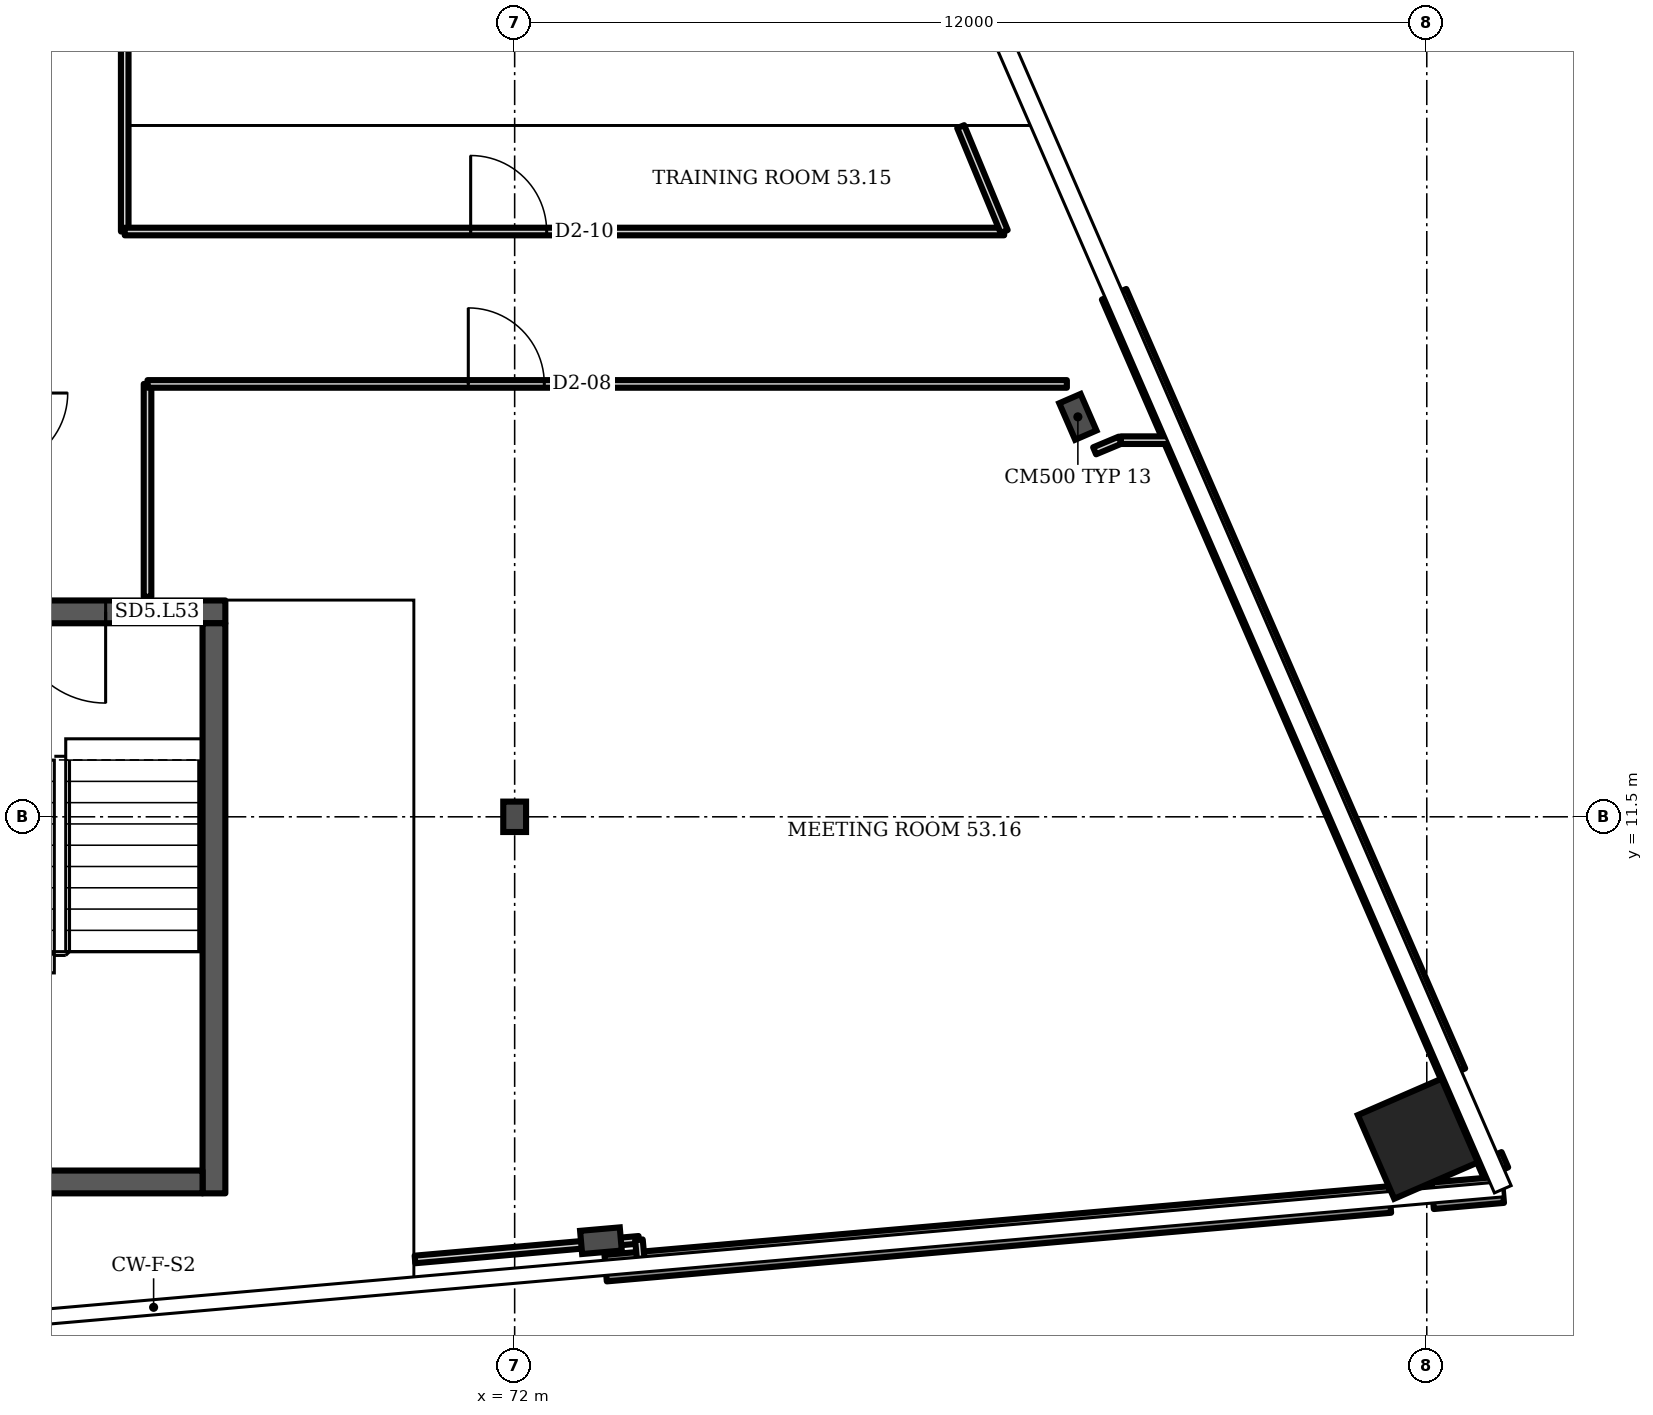
"""IFC4 building model, lengths in metres.
Left out: names, types, materials, properties, quantities, classifications, styles, units other than length and angle.
Written with IfcOpenShell. Run it as: python <this file> out.ifc"""

import sys

from ifc_helpers import new_model, si_unit, direction, frame, frame_2d, origin, origin_2d, place, context, subcontext, project, spatial, rectangle, i_section, extrude, element, fill, save


model = new_model("IFC4")
c1 = context("Model", 3, precision=1e-05, world=origin(), true_north=direction((0.0, 1.0)))
c2 = subcontext(c1, "Body", "Model", "MODEL_VIEW")
j1 = project(units=[si_unit("LENGTHUNIT", "METRE"), si_unit("PLANEANGLEUNIT", "RADIAN")], contexts=[c1])
p1 = place(None, origin())
s1 = spatial("IfcSite", under=j1, at=p1, CompositionType="ELEMENT")
p2 = place(p1, origin())
s2 = spatial("IfcBuilding", under=s1, at=p2, CompositionType="ELEMENT")
p3 = place(p2, frame((0.0, 0.0, 214.3)))
s3 = spatial("IfcBuildingStorey", under=s2, at=p3, CompositionType="ELEMENT", Elevation=214.3)
p4 = place(p3, frame((83.883, 7.265, 0.0), z_axis=(0.0, 0.0, 1.0), x_axis=(-0.398727, 0.917072, 0.0)))
e1 = element("IfcColumn", 1, at=p4, inside=s3, PredefinedType="COLUMN", context=c2, shape_type="SweptSolid", body=[
    extrude(rectangle(XDim=1.2, YDim=1.2, at=origin_2d()), origin(), (0.0, 0.0, 1.0), 3.6),
])
for number, where, z_axis, x_axis in (
    (2, (73.135, 5.923, 0.0), (0.0, 0.0, 1.0), (0.087, -0.996, 0.0)),
    (3, (79.41, 16.762, 0.0), (0.0, 0.0, 1.0), (0.917, 0.399, 0.0)),
):
    element("IfcColumn", number, at=place(p3, frame(where, z_axis=z_axis, x_axis=x_axis)), inside=s3, PredefinedType="COLUMN", context=c2, shape_type="SweptSolid", body=[
        extrude(i_section(OverallWidth=0.306, OverallDepth=0.524, WebThickness=0.021, FlangeThickness=0.04, FilletRadius=0.027, at=origin_2d()), origin(), (0.0, 0.0, 1.0), 3.6),
    ])
p5 = place(p3, frame((72.0, 11.5, 0.0), z_axis=(0.0, 0.0, 1.0), x_axis=(1.0, 0.0, 0.0)))
e4 = element("IfcColumn", 4, at=p5, inside=s3, PredefinedType="COLUMN", context=c2, shape_type="SweptSolid", body=[
    extrude(i_section(OverallWidth=0.3, OverallDepth=0.4, WebThickness=0.013, FlangeThickness=0.024, FilletRadius=0.027, at=origin_2d()), origin(), (0.0, 0.0, 1.0), 3.6),
])
p6 = place(p3, frame((73.197, 5.562, 0.0), z_axis=(0.0, 0.0, 1.0), x_axis=(0.996198, 0.087163, 0.0)))
e5 = element("IfcWall", 5, at=p6, inside=s3, PredefinedType="SOLIDWALL", context=c2, shape_type="SweptSolid", body=[
    extrude(rectangle(XDim=10.358, YDim=0.35, at=frame_2d((5.179, 0.0))), origin(), (0.0, 0.0, 1.0), 1.0),
])
p7 = place(p3, frame((84.078, 6.514, 0.0), z_axis=(0.0, 0.0, 1.0), x_axis=(0.996213, 0.086971, 0.0)))
e6 = element("IfcWall", 6, at=p7, inside=s3, PredefinedType="SOLIDWALL", context=c2, shape_type="SweptSolid", body=[
    extrude(rectangle(XDim=0.926, YDim=0.35, at=frame_2d((0.463, 0.0))), origin(), (0.0, 0.0, 1.0), 1.0),
])
p8 = place(p3, frame((84.91, 6.819, 0.0), z_axis=(0.0, 0.0, 1.0), x_axis=(-0.398359, 0.91723, 0.0)))
e7 = element("IfcWall", 7, at=p8, inside=s3, PredefinedType="SOLIDWALL", context=c2, shape_type="SweptSolid", body=[
    extrude(rectangle(XDim=0.219, YDim=0.35, at=frame_2d((0.109, 0.0))), origin(), (0.0, 0.0, 1.0), 1.0),
])
p9 = place(p3, frame((84.345, 8.12, 0.0), z_axis=(0.0, 0.0, 1.0), x_axis=(-0.398721, 0.917067, 0.0)))
e8 = element("IfcWall", 8, at=p9, inside=s3, PredefinedType="SOLIDWALL", context=c2, shape_type="SweptSolid", body=[
    extrude(rectangle(XDim=11.182, YDim=0.35, at=frame_2d((5.591, 0.0))), origin(), (0.0, 0.0, 1.0), 1.0),
])
p10 = place(p3, frame((63.844, 14.196, 0.0), z_axis=(0.0, 0.0, 1.0), x_axis=(1.0, 0.0, 0.0)))
e9 = element("IfcWall", 9, at=p10, inside=s3, PredefinedType="SHEAR", context=c2, shape_type="SweptSolid", body=[
    extrude(rectangle(XDim=4.35, YDim=0.3, at=frame_2d((2.175, 0.0))), origin(), (0.0, 0.0, 1.0), 3.2),
])
p11 = place(p10, frame((1.575, 0.0, 0.0)))
e10 = element("IfcOpeningElement", 10, at=p11, cuts=e9, PredefinedType="OPENING", context=c2, shape_type="SweptSolid", body=[
    extrude(rectangle(XDim=1.2, YDim=2.1, at=frame_2d((0.6, 1.05))), frame((0.0, 0.16, 0.0), z_axis=(0.0, -1.0, 0.0), x_axis=(1.0, 0.0, 0.0)), (0.0, 0.0, 1.0), 0.32),
])
p12 = place(p3, frame((66.87, 19.2, 0.0), z_axis=(0.0, 0.0, 1.0), x_axis=(0.0, 1.0, 0.0)))
e11 = element("IfcWall", 11, at=p12, inside=s3, PredefinedType="PARTITIONING", context=c2, shape_type="SweptSolid", body=[
    extrude(rectangle(XDim=2.575, YDim=0.1, at=frame_2d((1.288, 0.0))), origin(), (0.0, 0.0, 1.0), 3.2),
])
p13 = place(p3, frame((66.87, 19.2, 0.0), z_axis=(0.0, 0.0, 1.0), x_axis=(1.0, 0.0, 0.0)))
e12 = element("IfcWall", 12, at=p13, inside=s3, PredefinedType="PARTITIONING", context=c2, shape_type="SweptSolid", body=[
    extrude(rectangle(XDim=11.57, YDim=0.1, at=frame_2d((5.785, 0.0))), origin(), (0.0, 0.0, 1.0), 3.2),
])
p14 = place(p13, frame((4.551, 0.0, 0.0)))
e13 = element("IfcOpeningElement", 13, at=p14, cuts=e12, PredefinedType="OPENING", context=c2, shape_type="SweptSolid", body=[
    extrude(rectangle(XDim=1.0, YDim=2.1, at=frame_2d((0.5, 1.05))), frame((0.0, 0.06, 0.0), z_axis=(0.0, -1.0, 0.0), x_axis=(1.0, 0.0, 0.0)), (0.0, 0.0, 1.0), 0.12),
])
p15 = place(p3, frame((67.17, 14.395, 0.0), z_axis=(0.0, 0.0, 1.0), x_axis=(0.0, 1.0, 0.0)))
e14 = element("IfcWall", 14, at=p15, inside=s3, PredefinedType="PARTITIONING", context=c2, shape_type="SweptSolid", body=[
    extrude(rectangle(XDim=2.8, YDim=0.1, at=frame_2d((1.4, 0.0))), origin(), (0.0, 0.0, 1.0), 3.2),
])
p16 = place(p3, frame((67.17, 17.195, 0.0), z_axis=(0.0, 0.0, 1.0), x_axis=(1.0, 0.0, 0.0)))
e15 = element("IfcWall", 15, at=p16, inside=s3, PredefinedType="PARTITIONING", context=c2, shape_type="SweptSolid", body=[
    extrude(rectangle(XDim=12.095, YDim=0.1, at=frame_2d((6.047, 0.0))), origin(), (0.0, 0.0, 1.0), 3.2),
])
p17 = place(p16, frame((4.22, 0.0, 0.0)))
e16 = element("IfcOpeningElement", 16, at=p17, cuts=e15, PredefinedType="OPENING", context=c2, shape_type="SweptSolid", body=[
    extrude(rectangle(XDim=1.0, YDim=2.1, at=frame_2d((0.5, 1.05))), frame((0.0, 0.06, 0.0), z_axis=(0.0, -1.0, 0.0), x_axis=(1.0, 0.0, 0.0)), (0.0, 0.0, 1.0), 0.12),
])
p18 = place(p3, frame((70.689, 5.677, 0.0), z_axis=(0.0, 0.0, 1.0), x_axis=(0.996174, 0.087417, 0.0)))
e17 = element("IfcWall", 17, at=p18, inside=s3, PredefinedType="PARTITIONING", context=c2, shape_type="SweptSolid", body=[
    extrude(rectangle(XDim=2.958, YDim=0.1, at=frame_2d((1.479, 0.0))), origin(), (0.0, 0.0, 1.0), 2.58),
])
p19 = place(p3, frame((73.663, 5.628, 0.0), z_axis=(0.0, 0.0, 1.0), x_axis=(-0.091893, 0.995772, 0.0)))
e18 = element("IfcWall", 18, at=p19, inside=s3, PredefinedType="PARTITIONING", context=c2, shape_type="SweptSolid", body=[
    extrude(rectangle(XDim=0.308, YDim=0.1, at=frame_2d((0.154, 0.0))), origin(), (0.0, 0.0, 1.0), 3.2),
])
p20 = place(p3, frame((78.44, 19.2, 0.0), z_axis=(0.0, 0.0, 1.0), x_axis=(-0.382605, 0.923907, 0.0)))
e19 = element("IfcWall", 19, at=p20, inside=s3, PredefinedType="PARTITIONING", context=c2, shape_type="SweptSolid", body=[
    extrude(rectangle(XDim=1.494, YDim=0.1, at=frame_2d((0.747, 0.0))), origin(), (0.0, 0.0, 1.0), 3.2),
])
p21 = place(p3, frame((79.63, 16.315, 0.0), z_axis=(0.0, 0.0, 1.0), x_axis=(0.92262, 0.385713, 0.0)))
e20 = element("IfcWall", 20, at=p21, inside=s3, PredefinedType="PARTITIONING", context=c2, shape_type="SweptSolid", body=[
    extrude(rectangle(XDim=0.363, YDim=0.1, at=frame_2d((0.182, 0.0))), origin(), (0.0, 0.0, 1.0), 3.2),
])
p22 = place(p3, frame((79.975, 16.455, 0.0), z_axis=(0.0, 0.0, 1.0), x_axis=(1.0, 0.0, 0.0)))
e21 = element("IfcWall", 21, at=p22, inside=s3, PredefinedType="PARTITIONING", context=c2, shape_type="SweptSolid", body=[
    extrude(rectangle(XDim=0.718, YDim=0.1, at=frame_2d((0.359, 0.0))), origin(), (0.0, 0.0, 1.0), 3.2),
])
p23 = place(p3, frame((68.044, 6.546, 0.0), z_axis=(0.0, 0.0, 1.0), x_axis=(0.0, 1.0, 0.0)))
e22 = element("IfcWall", 22, at=p23, inside=s3, PredefinedType="SHEAR", context=c2, shape_type="SweptSolid", body=[
    extrude(rectangle(XDim=7.5, YDim=0.3, at=frame_2d((3.75, 0.0))), origin(), (0.0, 0.0, 1.0), 3.2),
])
p24 = place(p3, frame((64.144, 6.696, 0.0), z_axis=(0.0, 0.0, 1.0), x_axis=(1.0, 0.0, 0.0)))
e23 = element("IfcWall", 23, at=p24, inside=s3, PredefinedType="SHEAR", context=c2, shape_type="SweptSolid", body=[
    extrude(rectangle(XDim=3.75, YDim=0.3, at=frame_2d((1.875, 0.0))), origin(), (0.0, 0.0, 1.0), 3.2),
])
p25 = place(p11, origin())
e24 = element("IfcDoor", 24, at=p25, inside=s3, OperationType="SINGLE_SWING_RIGHT", PredefinedType="DOOR", context=c2, shape_type="SweptSolid", body=[
    extrude(rectangle(XDim=1.2, YDim=2.1, at=frame_2d((0.6, 1.05))), frame((0.0, 0.025, 0.0), z_axis=(0.0, -1.0, 0.0), x_axis=(1.0, 0.0, 0.0)), (0.0, 0.0, 1.0), 0.05),
])
fill(e10, e24)
p26 = place(p17, origin())
e25 = element("IfcDoor", 25, at=p26, inside=s3, OperationType="SINGLE_SWING_LEFT", PredefinedType="DOOR", context=c2, shape_type="SweptSolid", body=[
    extrude(rectangle(XDim=1.0, YDim=2.1, at=frame_2d((0.5, 1.05))), frame((0.0, 0.025, 0.0), z_axis=(0.0, -1.0, 0.0), x_axis=(1.0, 0.0, 0.0)), (0.0, 0.0, 1.0), 0.05),
])
fill(e16, e25)
p27 = place(p14, origin())
e26 = element("IfcDoor", 26, at=p27, inside=s3, OperationType="SINGLE_SWING_LEFT", PredefinedType="DOOR", context=c2, shape_type="SweptSolid", body=[
    extrude(rectangle(XDim=1.0, YDim=2.1, at=frame_2d((0.5, 1.05))), frame((0.0, 0.025, 0.0), z_axis=(0.0, -1.0, 0.0), x_axis=(1.0, 0.0, 0.0)), (0.0, 0.0, 1.0), 0.05),
])
fill(e13, e26)
save(model, sys.argv[1])
